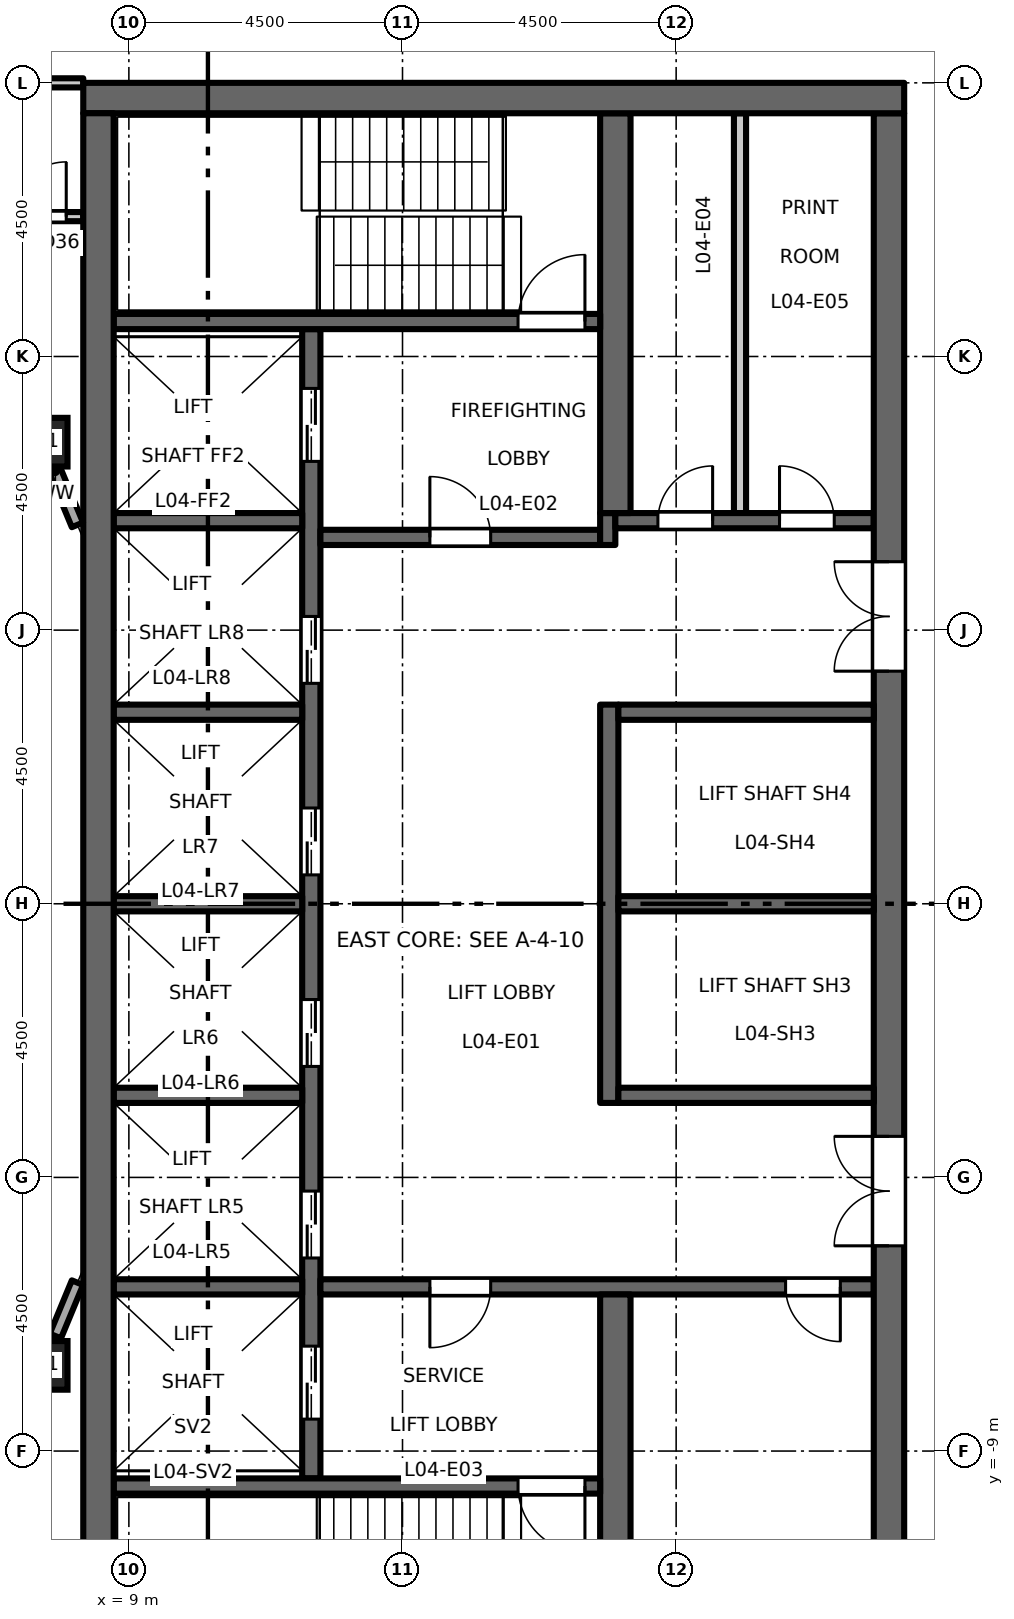
"""IFC4 building model, lengths in metres.
Left out: names, types, materials, properties, quantities, classifications, styles, units other than length and angle.
Written with IfcOpenShell. Run it as: python <this file> out.ifc"""

import sys

from ifc_helpers import new_model, si_unit, direction, frame, frame_2d, origin, origin_2d, place, context, subcontext, project, spatial, rectangle, hollow_rectangle, extrude, element, fill, save


model = new_model("IFC4")
c1 = context("Model", 3, precision=1e-05, world=origin(), true_north=direction((0.0, 1.0)))
c2 = subcontext(c1, "Body", "Model", "MODEL_VIEW")
j1 = project(units=[si_unit("LENGTHUNIT", "METRE"), si_unit("PLANEANGLEUNIT", "RADIAN")], contexts=[c1])
p1 = place(None, origin())
s1 = spatial("IfcSite", under=j1, at=p1, CompositionType="ELEMENT")
p2 = place(p1, origin())
s2 = spatial("IfcBuilding", under=s1, at=p2, CompositionType="ELEMENT")
p3 = place(p2, frame((0.0, 0.0, 22.2)))
s3 = spatial("IfcBuildingStorey", under=s2, at=p3, CompositionType="ELEMENT", Elevation=22.2)
for number, where, z_axis, x_axis in (
    (1, (7.591, -7.591, 0.0), (0.0, 0.0, 1.0), (1.0, 0.0, 0.0)),
    (2, (7.591, 7.591, 0.0), (0.0, 0.0, 1.0), (1.0, 0.0, 0.0)),
):
    element("IfcColumn", number, at=place(p3, frame(where, z_axis=z_axis, x_axis=x_axis)), inside=s3, PredefinedType="COLUMN", context=c2, shape_type="SweptSolid", body=[
        extrude(hollow_rectangle(XDim=0.8, YDim=0.8, WallThickness=0.05, at=origin_2d()), origin(), (0.0, 0.0, 1.0), 4.5),
    ])
p4 = place(p3, frame((12.0, -9.45, 0.0), z_axis=(0.0, 0.0, 1.0), x_axis=(0.0, 1.0, 0.0)))
e3 = element("IfcWall", 3, at=p4, inside=s3, PredefinedType="SHEAR", context=c2, shape_type="SweptSolid", body=[
    extrude(rectangle(XDim=18.9, YDim=0.3, at=frame_2d((9.45, 0.0))), origin(), (0.0, 0.0, 1.0), 4.35),
])
p5 = place(p4, frame((3.625, 0.0, 0.0)))
e4 = element("IfcOpeningElement", 4, at=p5, cuts=e3, PredefinedType="OPENING", context=c2, shape_type="SweptSolid", body=[
    extrude(rectangle(XDim=1.1, YDim=2.1, at=frame_2d((0.55, 1.05))), frame((0.0, 0.16, 0.0), z_axis=(0.0, -1.0, 0.0), x_axis=(1.0, 0.0, 0.0)), (0.0, 0.0, 1.0), 0.32),
])
p6 = place(p4, frame((6.775, 0.0, 0.0)))
e5 = element("IfcOpeningElement", 5, at=p6, cuts=e3, PredefinedType="OPENING", context=c2, shape_type="SweptSolid", body=[
    extrude(rectangle(XDim=1.1, YDim=2.1, at=frame_2d((0.55, 1.05))), frame((0.0, 0.16, 0.0), z_axis=(0.0, -1.0, 0.0), x_axis=(1.0, 0.0, 0.0)), (0.0, 0.0, 1.0), 0.32),
])
p7 = place(p4, frame((9.925, 0.0, 0.0)))
e6 = element("IfcOpeningElement", 6, at=p7, cuts=e3, PredefinedType="OPENING", context=c2, shape_type="SweptSolid", body=[
    extrude(rectangle(XDim=1.1, YDim=2.1, at=frame_2d((0.55, 1.05))), frame((0.0, 0.16, 0.0), z_axis=(0.0, -1.0, 0.0), x_axis=(1.0, 0.0, 0.0)), (0.0, 0.0, 1.0), 0.32),
])
p8 = place(p4, frame((13.075, 0.0, 0.0)))
e7 = element("IfcOpeningElement", 7, at=p8, cuts=e3, PredefinedType="OPENING", context=c2, shape_type="SweptSolid", body=[
    extrude(rectangle(XDim=1.1, YDim=2.1, at=frame_2d((0.55, 1.05))), frame((0.0, 0.16, 0.0), z_axis=(0.0, -1.0, 0.0), x_axis=(1.0, 0.0, 0.0)), (0.0, 0.0, 1.0), 0.32),
])
p9 = place(p4, frame((16.725, 0.0, 0.0)))
e8 = element("IfcOpeningElement", 8, at=p9, cuts=e3, PredefinedType="OPENING", context=c2, shape_type="SweptSolid", body=[
    extrude(rectangle(XDim=1.2, YDim=2.1, at=frame_2d((0.6, 1.05))), frame((0.0, 0.16, 0.0), z_axis=(0.0, -1.0, 0.0), x_axis=(1.0, 0.0, 0.0)), (0.0, 0.0, 1.0), 0.32),
])
p10 = place(p4, frame((0.975, 0.0, 0.0)))
e9 = element("IfcOpeningElement", 9, at=p10, cuts=e3, PredefinedType="OPENING", context=c2, shape_type="SweptSolid", body=[
    extrude(rectangle(XDim=1.2, YDim=2.1, at=frame_2d((0.6, 1.05))), frame((0.0, 0.16, 0.0), z_axis=(0.0, -1.0, 0.0), x_axis=(1.0, 0.0, 0.0)), (0.0, 0.0, 1.0), 0.32),
])
p11 = place(p3, frame((12.15, 6.025, 0.0), z_axis=(0.0, 0.0, 1.0), x_axis=(1.0, 0.0, 0.0)))
e10 = element("IfcWall", 10, at=p11, inside=s3, PredefinedType="SHEAR", context=c2, shape_type="SweptSolid", body=[
    extrude(rectangle(XDim=4.6, YDim=0.25, at=frame_2d((2.3, 0.0))), origin(), (0.0, 0.0, 1.0), 4.35),
])
p12 = place(p11, frame((1.8, 0.0, 0.0)))
e11 = element("IfcOpeningElement", 11, at=p12, cuts=e10, PredefinedType="OPENING", context=c2, shape_type="SweptSolid", body=[
    extrude(rectangle(XDim=1.0, YDim=2.1, at=frame_2d((0.5, 1.05))), frame((0.0, 0.135, 0.0), z_axis=(0.0, -1.0, 0.0), x_axis=(1.0, 0.0, 0.0)), (0.0, 0.0, 1.0), 0.27),
])
p13 = place(p3, frame((16.875, 5.9, 0.0), z_axis=(0.0, 0.0, 1.0), x_axis=(0.0, 1.0, 0.0)))
e12 = element("IfcWall", 12, at=p13, inside=s3, PredefinedType="SHEAR", context=c2, shape_type="SweptSolid", body=[
    extrude(rectangle(XDim=0.525, YDim=0.25, at=frame_2d((0.263, 0.0))), origin(), (0.0, 0.0, 1.0), 4.35),
])
p14 = place(p3, frame((17.0, 6.3, 0.0), z_axis=(0.0, 0.0, 1.0), x_axis=(1.0, 0.0, 0.0)))
e13 = element("IfcWall", 13, at=p14, inside=s3, PredefinedType="SHEAR", context=c2, shape_type="SweptSolid", body=[
    extrude(rectangle(XDim=4.25, YDim=0.25, at=frame_2d((2.125, 0.0))), origin(), (0.0, 0.0, 1.0), 4.35),
])
p15 = place(p14, frame((0.7, 0.0, 0.0)))
e14 = element("IfcOpeningElement", 14, at=p15, cuts=e13, PredefinedType="OPENING", context=c2, shape_type="SweptSolid", body=[
    extrude(rectangle(XDim=0.9, YDim=2.1, at=frame_2d((0.45, 1.05))), frame((0.0, 0.135, 0.0), z_axis=(0.0, -1.0, 0.0), x_axis=(1.0, 0.0, 0.0)), (0.0, 0.0, 1.0), 0.27),
])
p16 = place(p14, frame((2.7, 0.0, 0.0)))
e15 = element("IfcOpeningElement", 15, at=p16, cuts=e13, PredefinedType="OPENING", context=c2, shape_type="SweptSolid", body=[
    extrude(rectangle(XDim=0.9, YDim=2.1, at=frame_2d((0.45, 1.05))), frame((0.0, 0.135, 0.0), z_axis=(0.0, -1.0, 0.0), x_axis=(1.0, 0.0, 0.0)), (0.0, 0.0, 1.0), 0.27),
])
p17 = place(p3, frame((12.15, -6.3, 0.0), z_axis=(0.0, 0.0, 1.0), x_axis=(1.0, 0.0, 0.0)))
e16 = element("IfcWall", 16, at=p17, inside=s3, PredefinedType="SHEAR", context=c2, shape_type="SweptSolid", body=[
    extrude(rectangle(XDim=9.1, YDim=0.25, at=frame_2d((4.55, 0.0))), origin(), (0.0, 0.0, 1.0), 4.35),
])
p18 = place(p17, frame((1.8, 0.0, 0.0)))
e17 = element("IfcOpeningElement", 17, at=p18, cuts=e16, PredefinedType="OPENING", context=c2, shape_type="SweptSolid", body=[
    extrude(rectangle(XDim=1.0, YDim=2.1, at=frame_2d((0.5, 1.05))), frame((0.0, 0.135, 0.0), z_axis=(0.0, -1.0, 0.0), x_axis=(1.0, 0.0, 0.0)), (0.0, 0.0, 1.0), 0.27),
])
p19 = place(p17, frame((7.65, 0.0, 0.0)))
e18 = element("IfcOpeningElement", 18, at=p19, cuts=e16, PredefinedType="OPENING", context=c2, shape_type="SweptSolid", body=[
    extrude(rectangle(XDim=0.9, YDim=2.1, at=frame_2d((0.45, 1.05))), frame((0.0, 0.135, 0.0), z_axis=(0.0, -1.0, 0.0), x_axis=(1.0, 0.0, 0.0)), (0.0, 0.0, 1.0), 0.27),
])
p20 = place(p3, frame((21.5, -13.0, 0.0), z_axis=(0.0, 0.0, 1.0), x_axis=(0.0, 1.0, 0.0)))
e19 = element("IfcWall", 19, at=p20, inside=s3, PredefinedType="SHEAR", context=c2, shape_type="SweptSolid", body=[
    extrude(rectangle(XDim=26.0, YDim=0.5, at=frame_2d((13.0, 0.0))), origin(), (0.0, 0.0, 1.0), 4.35),
])
p21 = place(p20, frame((16.825, 0.0, 0.0)))
e20 = element("IfcOpeningElement", 20, at=p21, cuts=e19, PredefinedType="OPENING", context=c2, shape_type="SweptSolid", body=[
    extrude(rectangle(XDim=1.8, YDim=2.1, at=frame_2d((0.9, 1.05))), frame((0.0, 0.26, 0.0), z_axis=(0.0, -1.0, 0.0), x_axis=(1.0, 0.0, 0.0)), (0.0, 0.0, 1.0), 0.52),
])
p22 = place(p20, frame((7.375, 0.0, 0.0)))
e21 = element("IfcOpeningElement", 21, at=p22, cuts=e19, PredefinedType="OPENING", context=c2, shape_type="SweptSolid", body=[
    extrude(rectangle(XDim=1.8, YDim=2.1, at=frame_2d((0.9, 1.05))), frame((0.0, 0.26, 0.0), z_axis=(0.0, -1.0, 0.0), x_axis=(1.0, 0.0, 0.0)), (0.0, 0.0, 1.0), 0.52),
])
p23 = place(p3, frame((19.05, 6.425, 0.0), z_axis=(0.0, 0.0, 1.0), x_axis=(0.0, 1.0, 0.0)))
e22 = element("IfcWall", 22, at=p23, inside=s3, PredefinedType="PARTITIONING", context=c2, shape_type="SweptSolid", body=[
    extrude(rectangle(XDim=6.575, YDim=0.2, at=frame_2d((3.288, 0.0))), origin(), (0.0, 0.0, 1.0), 4.35),
])
p24 = place(p3, frame((16.9, -3.275, 0.0), z_axis=(0.0, 0.0, 1.0), x_axis=(0.0, 1.0, 0.0)))
e23 = element("IfcWall", 23, at=p24, inside=s3, PredefinedType="SHEAR", context=c2, shape_type="SweptSolid", body=[
    extrude(rectangle(XDim=6.55, YDim=0.3, at=frame_2d((3.275, 0.0))), origin(), (0.0, 0.0, 1.0), 4.35),
])
for number, where, z_axis, x_axis in (
    (24, (17.05, 0.0, 0.0), (0.0, 0.0, 1.0), (1.0, 0.0, 0.0)),
    (25, (17.05, 3.15, 0.0), (0.0, 0.0, 1.0), (1.0, 0.0, 0.0)),
    (26, (17.05, -3.15, 0.0), (0.0, 0.0, 1.0), (1.0, 0.0, 0.0)),
):
    element("IfcWall", number, at=place(p3, frame(where, z_axis=z_axis, x_axis=x_axis)), inside=s3, PredefinedType="SHEAR", context=c2, shape_type="SweptSolid", body=[
        extrude(rectangle(XDim=4.2, YDim=0.25, at=frame_2d((2.1, 0.0))), origin(), (0.0, 0.0, 1.0), 4.35),
    ])
for number, where, z_axis, x_axis in (
    (27, (17.0, 6.425, 0.0), (0.0, 0.0, 1.0), (0.0, 1.0, 0.0)),
    (28, (17.0, -13.0, 0.0), (0.0, 0.0, 1.0), (0.0, 1.0, 0.0)),
):
    element("IfcWall", number, at=place(p3, frame(where, z_axis=z_axis, x_axis=x_axis)), inside=s3, PredefinedType="SHEAR", context=c2, shape_type="SweptSolid", body=[
        extrude(rectangle(XDim=6.575, YDim=0.5, at=frame_2d((3.288, 0.0))), origin(), (0.0, 0.0, 1.0), 4.35),
    ])
for number, where, z_axis, x_axis in (
    (29, (8.75, 0.0, 0.0), (0.0, 0.0, 1.0), (1.0, 0.0, 0.0)),
    (30, (8.75, 3.15, 0.0), (0.0, 0.0, 1.0), (1.0, 0.0, 0.0)),
    (31, (8.75, 6.3, 0.0), (0.0, 0.0, 1.0), (1.0, 0.0, 0.0)),
    (32, (8.75, -3.15, 0.0), (0.0, 0.0, 1.0), (1.0, 0.0, 0.0)),
    (33, (8.75, -6.3, 0.0), (0.0, 0.0, 1.0), (1.0, 0.0, 0.0)),
):
    element("IfcWall", number, at=place(p3, frame(where, z_axis=z_axis, x_axis=x_axis)), inside=s3, PredefinedType="SHEAR", context=c2, shape_type="SweptSolid", body=[
        extrude(rectangle(XDim=3.1, YDim=0.25, at=frame_2d((1.55, 0.0))), origin(), (0.0, 0.0, 1.0), 4.35),
    ])
p25 = place(p3, frame((8.75, 9.575, 0.0), z_axis=(0.0, 0.0, 1.0), x_axis=(1.0, 0.0, 0.0)))
e34 = element("IfcWall", 34, at=p25, inside=s3, PredefinedType="SHEAR", context=c2, shape_type="SweptSolid", body=[
    extrude(rectangle(XDim=8.0, YDim=0.25, at=frame_2d((4.0, 0.0))), origin(), (0.0, 0.0, 1.0), 4.35),
])
p26 = place(p25, frame((6.65, 0.0, 0.0)))
e35 = element("IfcOpeningElement", 35, at=p26, cuts=e34, PredefinedType="OPENING", context=c2, shape_type="SweptSolid", body=[
    extrude(rectangle(XDim=1.1, YDim=2.1, at=frame_2d((0.55, 1.05))), frame((0.0, 0.135, 0.0), z_axis=(0.0, -1.0, 0.0), x_axis=(1.0, 0.0, 0.0)), (0.0, 0.0, 1.0), 0.27),
])
p27 = place(p3, frame((8.75, -9.575, 0.0), z_axis=(0.0, 0.0, 1.0), x_axis=(1.0, 0.0, 0.0)))
e36 = element("IfcWall", 36, at=p27, inside=s3, PredefinedType="SHEAR", context=c2, shape_type="SweptSolid", body=[
    extrude(rectangle(XDim=8.0, YDim=0.25, at=frame_2d((4.0, 0.0))), origin(), (0.0, 0.0, 1.0), 4.35),
])
p28 = place(p27, frame((6.65, 0.0, 0.0)))
e37 = element("IfcOpeningElement", 37, at=p28, cuts=e36, PredefinedType="OPENING", context=c2, shape_type="SweptSolid", body=[
    extrude(rectangle(XDim=1.1, YDim=2.1, at=frame_2d((0.55, 1.05))), frame((0.0, 0.135, 0.0), z_axis=(0.0, -1.0, 0.0), x_axis=(1.0, 0.0, 0.0)), (0.0, 0.0, 1.0), 0.27),
])
p29 = place(p3, frame((8.25, 13.25, 0.0), z_axis=(0.0, 0.0, 1.0), x_axis=(1.0, 0.0, 0.0)))
e38 = element("IfcWall", 38, at=p29, inside=s3, PredefinedType="SHEAR", context=c2, shape_type="SweptSolid", body=[
    extrude(rectangle(XDim=13.5, YDim=0.5, at=frame_2d((6.75, 0.0))), origin(), (0.0, 0.0, 1.0), 4.35),
])
p30 = place(p3, frame((8.5, -13.0, 0.0), z_axis=(0.0, 0.0, 1.0), x_axis=(0.0, 1.0, 0.0)))
e39 = element("IfcWall", 39, at=p30, inside=s3, PredefinedType="SHEAR", context=c2, shape_type="SweptSolid", body=[
    extrude(rectangle(XDim=26.0, YDim=0.5, at=frame_2d((13.0, 0.0))), origin(), (0.0, 0.0, 1.0), 4.35),
])
for number, where, z_axis, x_axis in (
    (40, (7.791, -7.108, 0.0), (0.0, 0.0, 1.0), (0.383, 0.924, 0.0)),
    (41, (8.154, 6.231, 0.0), (0.0, 0.0, 1.0), (-0.383, 0.924, 0.0)),
):
    element("IfcWall", number, at=place(p3, frame(where, z_axis=z_axis, x_axis=x_axis)), inside=s3, PredefinedType="STANDARD", context=c2, shape_type="SweptSolid", body=[
        extrude(rectangle(XDim=0.949, YDim=0.2, at=frame_2d((0.475, 0.0))), origin(), (0.0, 0.0, 1.0), 3.73),
    ])
p31 = place(p3, frame((6.92, 11.3, 0.0), z_axis=(0.0, 0.0, 1.0), x_axis=(1.0, 0.0, 0.0)))
e42 = element("IfcWall", 42, at=p31, inside=s3, PredefinedType="PARTITIONING", context=c2, shape_type="SweptSolid", body=[
    extrude(rectangle(XDim=1.33, YDim=0.15, at=frame_2d((0.665, 0.0))), origin(), (0.0, 0.0, 1.0), 4.35),
])
p32 = place(p31, frame((0.15, 0.0, 0.0)))
e43 = element("IfcOpeningElement", 43, at=p32, cuts=e42, PredefinedType="OPENING", context=c2, shape_type="SweptSolid", body=[
    extrude(rectangle(XDim=0.9, YDim=2.1, at=frame_2d((0.45, 1.05))), frame((0.0, 0.085, 0.0), z_axis=(0.0, -1.0, 0.0), x_axis=(1.0, 0.0, 0.0)), (0.0, 0.0, 1.0), 0.17),
])
p33 = place(p3, frame((-8.25, 13.5, 0.0), z_axis=(0.0, 0.0, 1.0), x_axis=(1.0, 0.0, 0.0)))
e44 = element("IfcWall", 44, at=p33, inside=s3, PredefinedType="PARTITIONING", context=c2, shape_type="SweptSolid", body=[
    extrude(rectangle(XDim=16.5, YDim=0.15, at=frame_2d((8.25, 0.0))), origin(), (0.0, 0.0, 1.0), 3.85),
])
p34 = place(p33, frame((7.65, 0.0, 0.0)))
e45 = element("IfcOpeningElement", 45, at=p34, cuts=e44, PredefinedType="OPENING", context=c2, shape_type="SweptSolid", body=[
    extrude(rectangle(XDim=1.0, YDim=2.1, at=frame_2d((0.5, 1.05))), frame((0.0, 0.085, 0.0), z_axis=(0.0, -1.0, 0.0), x_axis=(1.0, 0.0, 0.0)), (0.0, 0.0, 1.0), 0.17),
])
p35 = place(p12, origin())
e46 = element("IfcDoor", 46, at=p35, inside=s3, OperationType="SINGLE_SWING_RIGHT", PredefinedType="DOOR", context=c2, shape_type="SweptSolid", body=[
    extrude(rectangle(XDim=1.0, YDim=2.1, at=frame_2d((0.5, 1.05))), frame((0.0, 0.025, 0.0), z_axis=(0.0, -1.0, 0.0), x_axis=(1.0, 0.0, 0.0)), (0.0, 0.0, 1.0), 0.05),
])
fill(e11, e46)
p36 = place(p18, origin())
e47 = element("IfcDoor", 47, at=p36, inside=s3, OperationType="SINGLE_SWING_LEFT", PredefinedType="DOOR", context=c2, shape_type="SweptSolid", body=[
    extrude(rectangle(XDim=1.0, YDim=2.1, at=frame_2d((0.5, 1.05))), frame((0.0, 0.025, 0.0), z_axis=(0.0, -1.0, 0.0), x_axis=(1.0, 0.0, 0.0)), (0.0, 0.0, 1.0), 0.05),
])
fill(e17, e47)
p37 = place(p26, origin())
e48 = element("IfcDoor", 48, at=p37, inside=s3, OperationType="SINGLE_SWING_LEFT", PredefinedType="DOOR", context=c2, shape_type="SweptSolid", body=[
    extrude(rectangle(XDim=1.1, YDim=2.1, at=frame_2d((0.55, 1.05))), frame((0.0, 0.025, 0.0), z_axis=(0.0, -1.0, 0.0), x_axis=(1.0, 0.0, 0.0)), (0.0, 0.0, 1.0), 0.05),
])
fill(e35, e48)
p38 = place(p28, origin())
e49 = element("IfcDoor", 49, at=p38, inside=s3, OperationType="SINGLE_SWING_RIGHT", PredefinedType="DOOR", context=c2, shape_type="SweptSolid", body=[
    extrude(rectangle(XDim=1.1, YDim=2.1, at=frame_2d((0.55, 1.05))), frame((0.0, 0.025, 0.0), z_axis=(0.0, -1.0, 0.0), x_axis=(1.0, 0.0, 0.0)), (0.0, 0.0, 1.0), 0.05),
])
fill(e37, e49)
p39 = place(p21, origin())
e50 = element("IfcDoor", 50, at=p39, inside=s3, OperationType="DOUBLE_DOOR_DOUBLE_SWING", PredefinedType="DOOR", context=c2, shape_type="SweptSolid", body=[
    extrude(rectangle(XDim=1.8, YDim=2.1, at=frame_2d((0.9, 1.05))), frame((0.0, 0.025, 0.0), z_axis=(0.0, -1.0, 0.0), x_axis=(1.0, 0.0, 0.0)), (0.0, 0.0, 1.0), 0.05),
])
fill(e20, e50)
p40 = place(p22, origin())
e51 = element("IfcDoor", 51, at=p40, inside=s3, OperationType="DOUBLE_DOOR_DOUBLE_SWING", PredefinedType="DOOR", context=c2, shape_type="SweptSolid", body=[
    extrude(rectangle(XDim=1.8, YDim=2.1, at=frame_2d((0.9, 1.05))), frame((0.0, 0.025, 0.0), z_axis=(0.0, -1.0, 0.0), x_axis=(1.0, 0.0, 0.0)), (0.0, 0.0, 1.0), 0.05),
])
fill(e21, e51)
p41 = place(p5, origin())
e52 = element("IfcDoor", 52, at=p41, inside=s3, OperationType="DOUBLE_DOOR_SLIDING", PredefinedType="DOOR", context=c2, shape_type="SweptSolid", body=[
    extrude(rectangle(XDim=1.1, YDim=2.1, at=frame_2d((0.55, 1.05))), frame((0.0, 0.025, 0.0), z_axis=(0.0, -1.0, 0.0), x_axis=(1.0, 0.0, 0.0)), (0.0, 0.0, 1.0), 0.05),
])
fill(e4, e52)
p42 = place(p6, origin())
e53 = element("IfcDoor", 53, at=p42, inside=s3, OperationType="DOUBLE_DOOR_SLIDING", PredefinedType="DOOR", context=c2, shape_type="SweptSolid", body=[
    extrude(rectangle(XDim=1.1, YDim=2.1, at=frame_2d((0.55, 1.05))), frame((0.0, 0.025, 0.0), z_axis=(0.0, -1.0, 0.0), x_axis=(1.0, 0.0, 0.0)), (0.0, 0.0, 1.0), 0.05),
])
fill(e5, e53)
p43 = place(p7, origin())
e54 = element("IfcDoor", 54, at=p43, inside=s3, OperationType="DOUBLE_DOOR_SLIDING", PredefinedType="DOOR", context=c2, shape_type="SweptSolid", body=[
    extrude(rectangle(XDim=1.1, YDim=2.1, at=frame_2d((0.55, 1.05))), frame((0.0, 0.025, 0.0), z_axis=(0.0, -1.0, 0.0), x_axis=(1.0, 0.0, 0.0)), (0.0, 0.0, 1.0), 0.05),
])
fill(e6, e54)
p44 = place(p8, origin())
e55 = element("IfcDoor", 55, at=p44, inside=s3, OperationType="DOUBLE_DOOR_SLIDING", PredefinedType="DOOR", context=c2, shape_type="SweptSolid", body=[
    extrude(rectangle(XDim=1.1, YDim=2.1, at=frame_2d((0.55, 1.05))), frame((0.0, 0.025, 0.0), z_axis=(0.0, -1.0, 0.0), x_axis=(1.0, 0.0, 0.0)), (0.0, 0.0, 1.0), 0.05),
])
fill(e7, e55)
p45 = place(p9, origin())
e56 = element("IfcDoor", 56, at=p45, inside=s3, OperationType="DOUBLE_DOOR_SLIDING", PredefinedType="DOOR", context=c2, shape_type="SweptSolid", body=[
    extrude(rectangle(XDim=1.2, YDim=2.1, at=frame_2d((0.6, 1.05))), frame((0.0, 0.025, 0.0), z_axis=(0.0, -1.0, 0.0), x_axis=(1.0, 0.0, 0.0)), (0.0, 0.0, 1.0), 0.05),
])
fill(e8, e56)
p46 = place(p10, origin())
e57 = element("IfcDoor", 57, at=p46, inside=s3, OperationType="DOUBLE_DOOR_SLIDING", PredefinedType="DOOR", context=c2, shape_type="SweptSolid", body=[
    extrude(rectangle(XDim=1.2, YDim=2.1, at=frame_2d((0.6, 1.05))), frame((0.0, 0.025, 0.0), z_axis=(0.0, -1.0, 0.0), x_axis=(1.0, 0.0, 0.0)), (0.0, 0.0, 1.0), 0.05),
])
fill(e9, e57)
p47 = place(p15, origin())
e58 = element("IfcDoor", 58, at=p47, inside=s3, OperationType="SINGLE_SWING_LEFT", PredefinedType="DOOR", context=c2, shape_type="SweptSolid", body=[
    extrude(rectangle(XDim=0.9, YDim=2.1, at=frame_2d((0.45, 1.05))), frame((0.0, 0.025, 0.0), z_axis=(0.0, -1.0, 0.0), x_axis=(1.0, 0.0, 0.0)), (0.0, 0.0, 1.0), 0.05),
])
fill(e14, e58)
p48 = place(p16, origin())
e59 = element("IfcDoor", 59, at=p48, inside=s3, OperationType="SINGLE_SWING_RIGHT", PredefinedType="DOOR", context=c2, shape_type="SweptSolid", body=[
    extrude(rectangle(XDim=0.9, YDim=2.1, at=frame_2d((0.45, 1.05))), frame((0.0, 0.025, 0.0), z_axis=(0.0, -1.0, 0.0), x_axis=(1.0, 0.0, 0.0)), (0.0, 0.0, 1.0), 0.05),
])
fill(e15, e59)
p49 = place(p19, origin())
e60 = element("IfcDoor", 60, at=p49, inside=s3, OperationType="SINGLE_SWING_RIGHT", PredefinedType="DOOR", context=c2, shape_type="SweptSolid", body=[
    extrude(rectangle(XDim=0.9, YDim=2.1, at=frame_2d((0.45, 1.05))), frame((0.0, 0.025, 0.0), z_axis=(0.0, -1.0, 0.0), x_axis=(1.0, 0.0, 0.0)), (0.0, 0.0, 1.0), 0.05),
])
fill(e18, e60)
p50 = place(p32, origin())
e61 = element("IfcDoor", 61, at=p50, inside=s3, OperationType="SINGLE_SWING_RIGHT", PredefinedType="DOOR", context=c2, shape_type="SweptSolid", body=[
    extrude(rectangle(XDim=0.9, YDim=2.1, at=frame_2d((0.45, 1.05))), frame((0.0, 0.025, 0.0), z_axis=(0.0, -1.0, 0.0), x_axis=(1.0, 0.0, 0.0)), (0.0, 0.0, 1.0), 0.05),
])
fill(e43, e61)
save(model, sys.argv[1])
